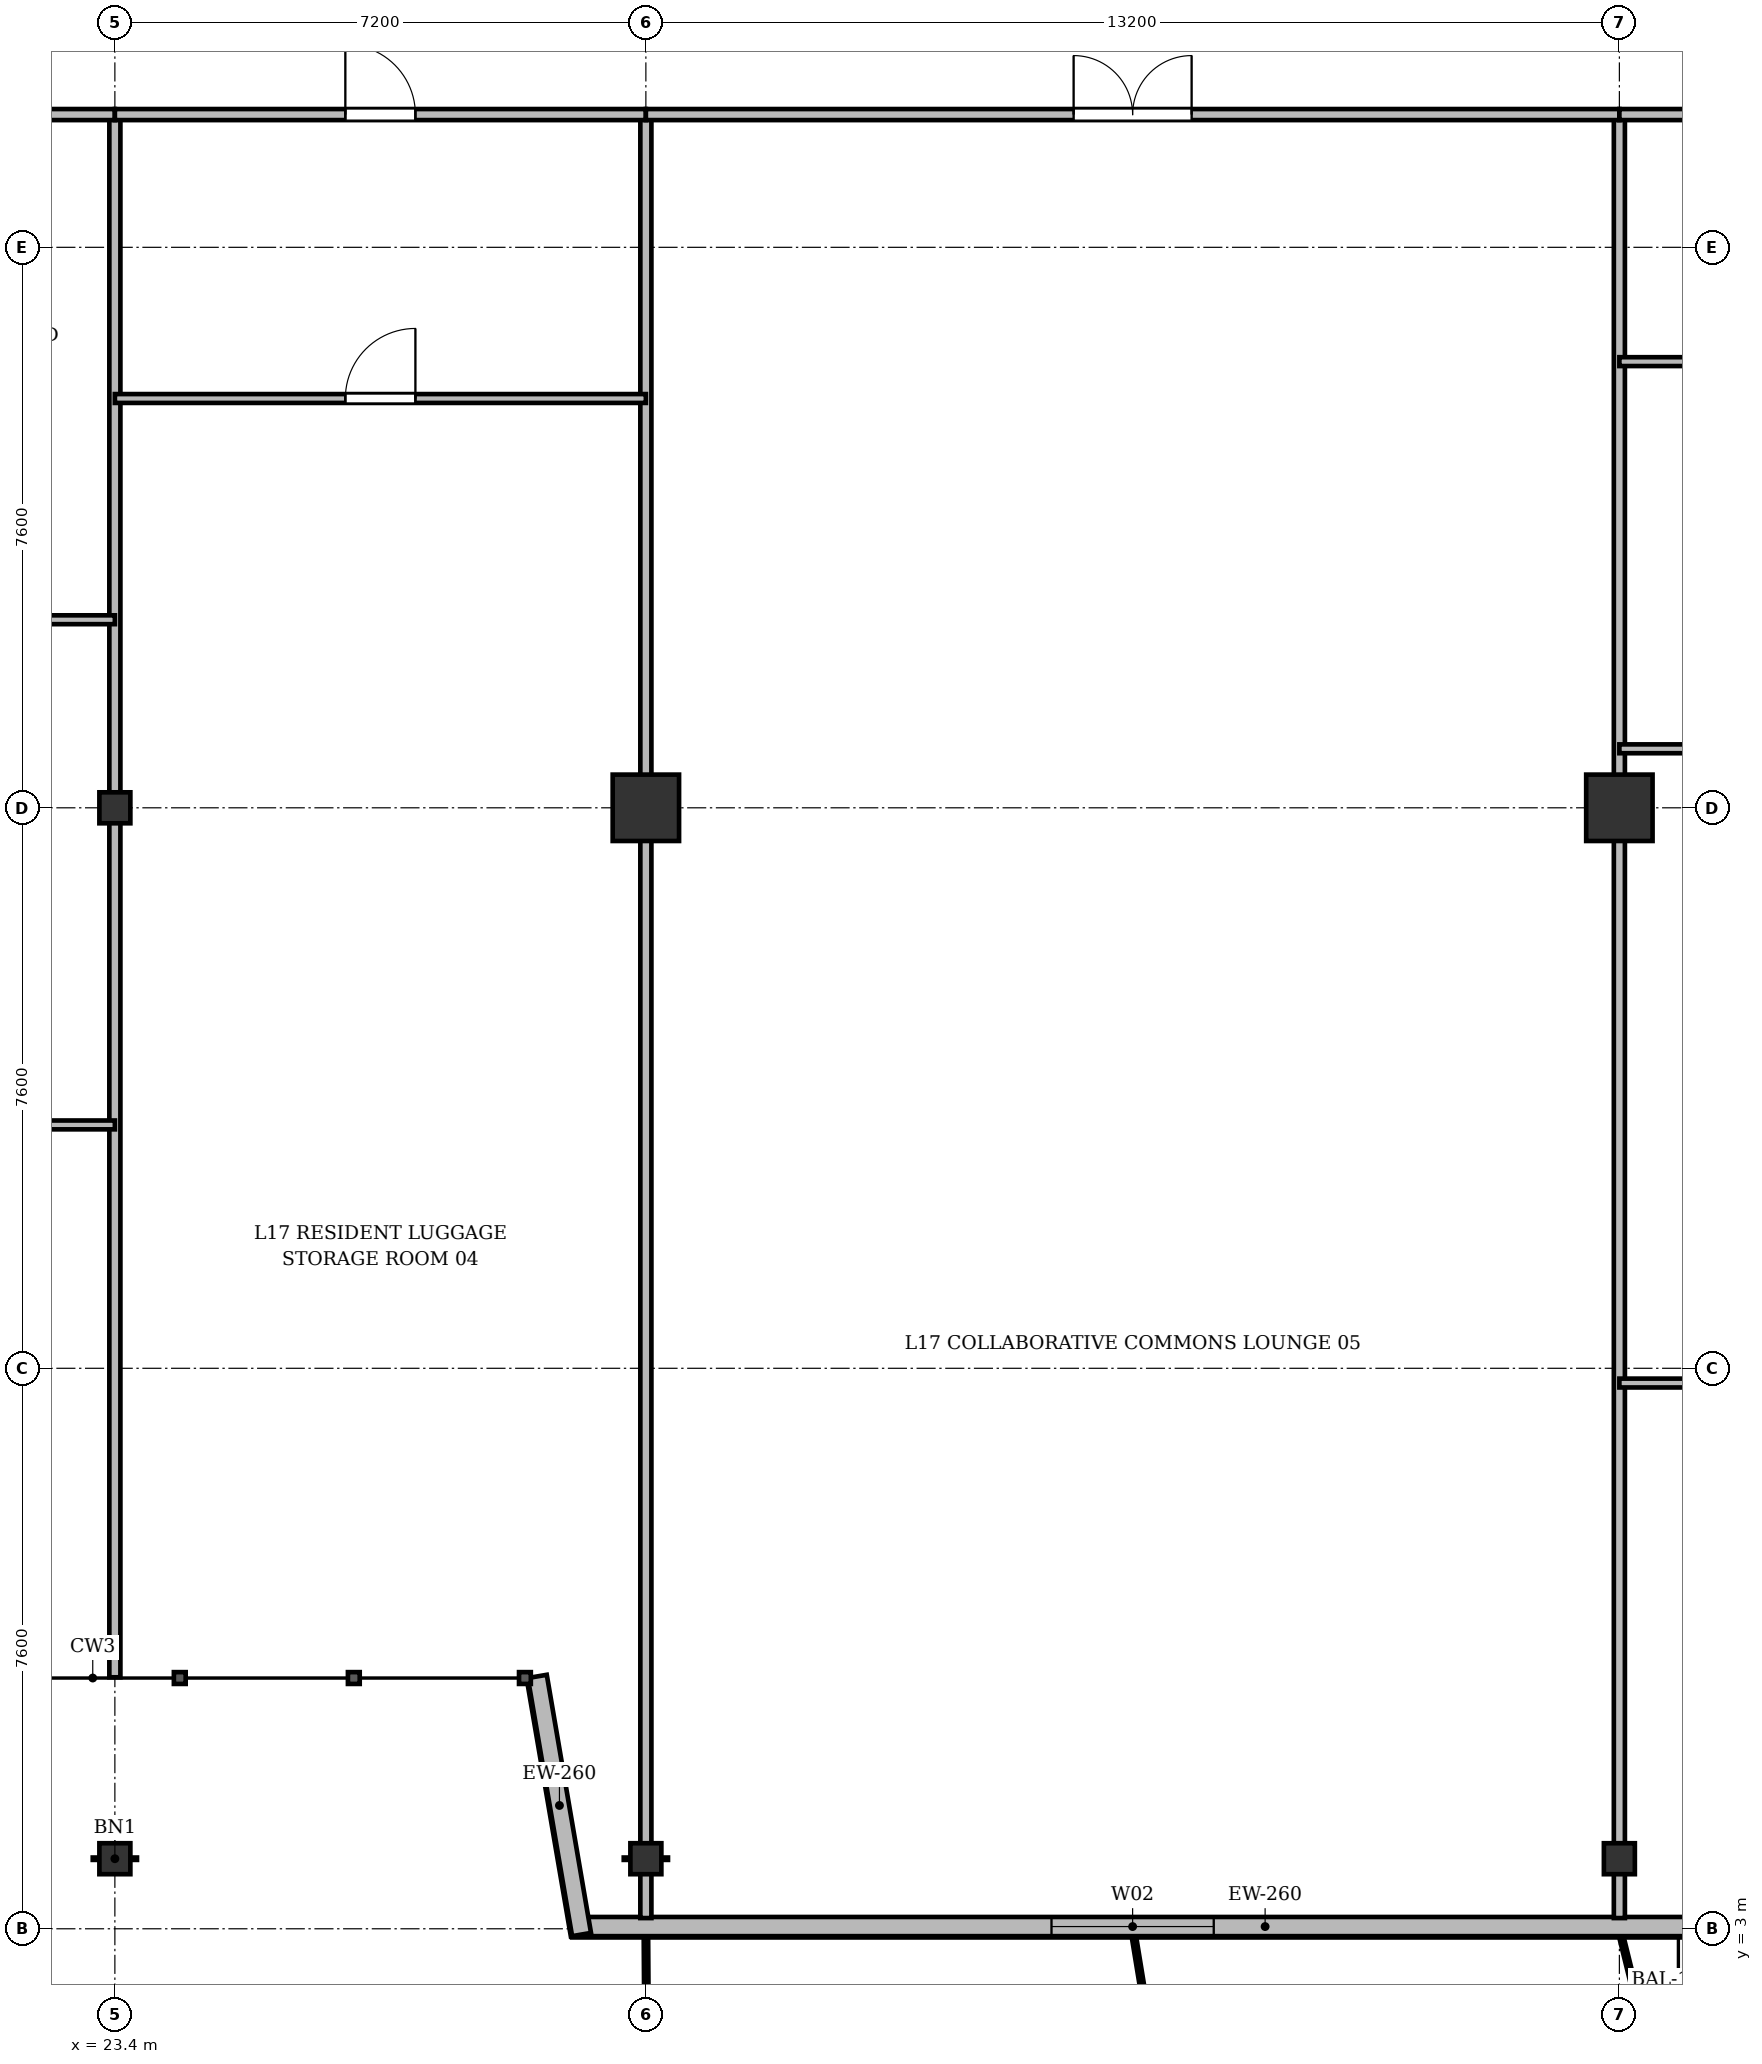
"""IFC4 building model, lengths in metres.
Left out: names, types, materials, properties, quantities, classifications, styles, units other than length and angle.
Written with IfcOpenShell. Run it as: python <this file> out.ifc"""

import sys

from ifc_helpers import new_model, si_unit, direction, frame, frame_2d, origin, origin_2d, place, context, subcontext, project, spatial, rectangle, i_section, extrude, source, transform, mapped, element, fill, save


model = new_model("IFC4")
c1 = context("Model", 3, precision=1e-05, world=origin(), true_north=direction((0.0, 1.0)))
c2 = subcontext(c1, "Body", "Model", "MODEL_VIEW")
j1 = project(units=[si_unit("LENGTHUNIT", "METRE"), si_unit("PLANEANGLEUNIT", "RADIAN")], contexts=[c1])
p1 = place(None, origin())
s1 = spatial("IfcSite", under=j1, at=p1, CompositionType="ELEMENT")
p2 = place(p1, origin())
s2 = spatial("IfcBuilding", under=s1, at=p2, CompositionType="ELEMENT")
p3 = place(p2, frame((0.0, 0.0, 66.7)))
s3 = spatial("IfcBuildingStorey", under=s2, at=p3, CompositionType="ELEMENT", Elevation=66.7)
m1 = source(origin(), c2, "Body", "SweptSolid", [
    extrude(i_section(OverallWidth=0.42, OverallDepth=0.42, WebThickness=0.026, FlangeThickness=0.04, at=origin_2d()), origin(), (0.0, 0.0, 1.0), 3.6),
])
for number, where, z_axis, x_axis in (
    (1, (23.4, 3.95, 0.0), (0.0, 0.0, 1.0), (1.0, 0.0, 0.0)),
    (2, (23.4, 18.2, 0.0), (0.0, 0.0, 1.0), (1.0, 0.0, 0.0)),
    (3, (30.6, 3.95, 0.0), (0.0, 0.0, 1.0), (1.0, 0.0, 0.0)),
):
    element("IfcColumn", number, at=place(p3, frame(where, z_axis=z_axis, x_axis=x_axis)), inside=s3, PredefinedType="COLUMN", context=c2, shape_type="MappedRepresentation", body=[
        mapped(m1, transform((0.0, 0.0, 0.0), x_axis=(1.0, 0.0, 0.0), y_axis=(0.0, 1.0, 0.0), z_axis=(0.0, 0.0, 1.0), scale=1.0)),
    ])
m2 = source(origin(), c2, "Body", "SweptSolid", [
    extrude(rectangle(XDim=0.9, YDim=0.9, at=origin_2d()), origin(), (0.0, 0.0, 1.0), 3.6),
])
p4 = place(p3, frame((30.6, 18.2, 0.0), z_axis=(0.0, 0.0, 1.0), x_axis=(1.0, 0.0, 0.0)))
e4 = element("IfcColumn", 4, at=p4, inside=s3, PredefinedType="COLUMN", context=c2, shape_type="MappedRepresentation", body=[
    mapped(m2, transform((0.0, 0.0, 0.0), x_axis=(1.0, 0.0, 0.0), y_axis=(0.0, 1.0, 0.0), z_axis=(0.0, 0.0, 1.0), scale=1.0)),
])
p5 = place(p3, frame((43.8, 3.95, 0.0), z_axis=(0.0, 0.0, 1.0), x_axis=(1.0, 0.0, 0.0)))
e5 = element("IfcColumn", 5, at=p5, inside=s3, PredefinedType="COLUMN", context=c2, shape_type="MappedRepresentation", body=[
    mapped(m1, transform((0.0, 0.0, 0.0), x_axis=(1.0, 0.0, 0.0), y_axis=(0.0, 1.0, 0.0), z_axis=(0.0, 0.0, 1.0), scale=1.0)),
])
p6 = place(p3, frame((43.8, 18.2, 0.0), z_axis=(0.0, 0.0, 1.0), x_axis=(1.0, 0.0, 0.0)))
e6 = element("IfcColumn", 6, at=p6, inside=s3, PredefinedType="COLUMN", context=c2, shape_type="MappedRepresentation", body=[
    mapped(m2, transform((0.0, 0.0, 0.0), x_axis=(1.0, 0.0, 0.0), y_axis=(0.0, 1.0, 0.0), z_axis=(0.0, 0.0, 1.0), scale=1.0)),
])
p7 = place(p3, frame((66.9, 3.03, 0.0), z_axis=(0.0, 0.0, 1.0), x_axis=(-1.0, 0.0, 0.0)))
e7 = element("IfcWall", 7, at=p7, inside=s3, PredefinedType="SOLIDWALL", context=c2, shape_type="SweptSolid", body=[
    extrude(rectangle(XDim=37.3, YDim=0.26, at=frame_2d((18.65, 0.0))), origin(), (0.0, 0.0, 1.0), 3.34),
])
p8 = place(p7, frame((3.345, 0.0, 0.9)))
e8 = element("IfcOpeningElement", 8, at=p8, cuts=e7, PredefinedType="OPENING", context=c2, shape_type="SweptSolid", body=[
    extrude(rectangle(XDim=1.5, YDim=1.75, at=frame_2d((0.75, 0.875))), frame((0.0, 0.14, 0.0), z_axis=(0.0, -1.0, 0.0), x_axis=(1.0, 0.0, 0.0)), (0.0, 0.0, 1.0), 0.28),
])
p9 = place(p7, frame((11.0, 0.0, 0.9)))
e9 = element("IfcOpeningElement", 9, at=p9, cuts=e7, PredefinedType="OPENING", context=c2, shape_type="SweptSolid", body=[
    extrude(rectangle(XDim=2.0, YDim=1.95, at=frame_2d((1.0, 0.975))), frame((0.0, 0.14, 0.0), z_axis=(0.0, -1.0, 0.0), x_axis=(1.0, 0.0, 0.0)), (0.0, 0.0, 1.0), 0.28),
])
p10 = place(p7, frame((17.007, 0.0, 0.0)))
e10 = element("IfcOpeningElement", 10, at=p10, cuts=e7, PredefinedType="OPENING", context=c2, shape_type="SweptSolid", body=[
    extrude(rectangle(XDim=1.2, YDim=2.2, at=frame_2d((0.6, 1.1))), frame((0.0, 0.14, 0.0), z_axis=(0.0, -1.0, 0.0), x_axis=(1.0, 0.0, 0.0)), (0.0, 0.0, 1.0), 0.28),
])
p11 = place(p7, frame((20.4, 0.0, 0.9)))
e11 = element("IfcOpeningElement", 11, at=p11, cuts=e7, PredefinedType="OPENING", context=c2, shape_type="SweptSolid", body=[
    extrude(rectangle(XDim=1.8, YDim=1.8, at=frame_2d((0.9, 0.9))), frame((0.0, 0.14, 0.0), z_axis=(0.0, -1.0, 0.0), x_axis=(1.0, 0.0, 0.0)), (0.0, 0.0, 1.0), 0.28),
])
p12 = place(p7, frame((28.6, 0.0, 0.9)))
e12 = element("IfcOpeningElement", 12, at=p12, cuts=e7, PredefinedType="OPENING", context=c2, shape_type="SweptSolid", body=[
    extrude(rectangle(XDim=2.2, YDim=1.8, at=frame_2d((1.1, 0.9))), frame((0.0, 0.14, 0.0), z_axis=(0.0, -1.0, 0.0), x_axis=(1.0, 0.0, 0.0)), (0.0, 0.0, 1.0), 0.28),
])
p13 = place(p3, frame((29.728, 2.922, 0.0), z_axis=(0.0, 0.0, 1.0), x_axis=(-0.168923741424, 0.98562912375, 0.0)))
e13 = element("IfcWall", 13, at=p13, inside=s3, PredefinedType="SOLIDWALL", context=c2, shape_type="SweptSolid", body=[
    extrude(rectangle(XDim=3.551, YDim=0.26, at=frame_2d((1.775, 0.0))), origin(), (0.0, 0.0, 1.0), 2.69),
])
p14 = place(p3, frame((23.4, 6.41, 0.0), z_axis=(0.0, 0.0, 1.0), x_axis=(0.0, 1.0, 0.0)))
e14 = element("IfcWall", 14, at=p14, inside=s3, PredefinedType="PARTITIONING", context=c2, shape_type="SweptSolid", body=[
    extrude(rectangle(XDim=21.19, YDim=0.15, at=frame_2d((10.595, 0.0))), origin(), (0.0, 0.0, 1.0), 2.752),
])
for number, where, z_axis, x_axis in (
    (15, (30.6, 3.145, 0.0), (0.0, 0.0, 1.0), (0.0, 1.0, 0.0)),
    (16, (43.8, 3.145, 0.0), (0.0, 0.0, 1.0), (0.0, 1.0, 0.0)),
):
    element("IfcWall", number, at=place(p3, frame(where, z_axis=z_axis, x_axis=x_axis)), inside=s3, PredefinedType="PARTITIONING", context=c2, shape_type="SweptSolid", body=[
        extrude(rectangle(XDim=24.455, YDim=0.15, at=frame_2d((12.228, 0.0))), origin(), (0.0, 0.0, 1.0), 2.752),
    ])
p15 = place(p3, frame((15.6, 20.75, 0.0), z_axis=(0.0, 0.0, 1.0), x_axis=(1.0, 0.0, 0.0)))
e17 = element("IfcWall", 17, at=p15, inside=s3, PredefinedType="PARTITIONING", context=c2, shape_type="SweptSolid", body=[
    extrude(rectangle(XDim=7.8, YDim=0.12, at=frame_2d((3.9, 0.0))), origin(), (0.0, 0.0, 1.0), 2.752),
])
p16 = place(p15, frame((3.333, 0.0, 0.0)))
e18 = element("IfcOpeningElement", 18, at=p16, cuts=e17, PredefinedType="OPENING", context=c2, shape_type="SweptSolid", body=[
    extrude(rectangle(XDim=0.95, YDim=2.15, at=frame_2d((0.475, 1.075))), frame((0.0, 0.07, 0.0), z_axis=(0.0, -1.0, 0.0), x_axis=(1.0, 0.0, 0.0)), (0.0, 0.0, 1.0), 0.14),
])
p17 = place(p3, frame((15.6, 27.6, 0.0), z_axis=(0.0, 0.0, 1.0), x_axis=(1.0, 0.0, 0.0)))
e19 = element("IfcWall", 19, at=p17, inside=s3, PredefinedType="PARTITIONING", context=c2, shape_type="SweptSolid", body=[
    extrude(rectangle(XDim=7.8, YDim=0.15, at=frame_2d((3.9, 0.0))), origin(), (0.0, 0.0, 1.0), 2.752),
])
p18 = place(p17, frame((5.172, 0.0, 0.0)))
e20 = element("IfcOpeningElement", 20, at=p18, cuts=e19, PredefinedType="OPENING", context=c2, shape_type="SweptSolid", body=[
    extrude(rectangle(XDim=0.95, YDim=2.15, at=frame_2d((0.475, 1.075))), frame((0.0, 0.085, 0.0), z_axis=(0.0, -1.0, 0.0), x_axis=(1.0, 0.0, 0.0)), (0.0, 0.0, 1.0), 0.17),
])
p19 = place(p3, frame((19.5, 13.9, 0.0), z_axis=(0.0, 0.0, 1.0), x_axis=(1.0, 0.0, 0.0)))
e21 = element("IfcWall", 21, at=p19, inside=s3, PredefinedType="PARTITIONING", context=c2, shape_type="SweptSolid", body=[
    extrude(rectangle(XDim=3.9, YDim=0.12, at=frame_2d((1.95, 0.0))), origin(), (0.0, 0.0, 1.0), 2.752),
])
p20 = place(p19, frame((1.475, 0.0, 0.0)))
e22 = element("IfcOpeningElement", 22, at=p20, cuts=e21, PredefinedType="OPENING", context=c2, shape_type="SweptSolid", body=[
    extrude(rectangle(XDim=0.95, YDim=2.15, at=frame_2d((0.475, 1.075))), frame((0.0, 0.07, 0.0), z_axis=(0.0, -1.0, 0.0), x_axis=(1.0, 0.0, 0.0)), (0.0, 0.0, 1.0), 0.14),
])
p21 = place(p3, frame((23.4, 27.6, 0.0), z_axis=(0.0, 0.0, 1.0), x_axis=(1.0, 0.0, 0.0)))
e23 = element("IfcWall", 23, at=p21, inside=s3, PredefinedType="PARTITIONING", context=c2, shape_type="SweptSolid", body=[
    extrude(rectangle(XDim=7.2, YDim=0.15, at=frame_2d((3.6, 0.0))), origin(), (0.0, 0.0, 1.0), 2.752),
])
p22 = place(p21, frame((3.125, 0.0, 0.0)))
e24 = element("IfcOpeningElement", 24, at=p22, cuts=e23, PredefinedType="OPENING", context=c2, shape_type="SweptSolid", body=[
    extrude(rectangle(XDim=0.95, YDim=2.15, at=frame_2d((0.475, 1.075))), frame((0.0, 0.085, 0.0), z_axis=(0.0, -1.0, 0.0), x_axis=(1.0, 0.0, 0.0)), (0.0, 0.0, 1.0), 0.17),
])
p23 = place(p3, frame((23.4, 23.75, 0.0), z_axis=(0.0, 0.0, 1.0), x_axis=(1.0, 0.0, 0.0)))
e25 = element("IfcWall", 25, at=p23, inside=s3, PredefinedType="PARTITIONING", context=c2, shape_type="SweptSolid", body=[
    extrude(rectangle(XDim=7.2, YDim=0.12, at=frame_2d((3.6, 0.0))), origin(), (0.0, 0.0, 1.0), 2.752),
])
p24 = place(p23, frame((3.125, 0.0, 0.0)))
e26 = element("IfcOpeningElement", 26, at=p24, cuts=e25, PredefinedType="OPENING", context=c2, shape_type="SweptSolid", body=[
    extrude(rectangle(XDim=0.95, YDim=2.15, at=frame_2d((0.475, 1.075))), frame((0.0, 0.07, 0.0), z_axis=(0.0, -1.0, 0.0), x_axis=(1.0, 0.0, 0.0)), (0.0, 0.0, 1.0), 0.14),
])
p25 = place(p3, frame((30.6, 27.6, 0.0), z_axis=(0.0, 0.0, 1.0), x_axis=(1.0, 0.0, 0.0)))
e27 = element("IfcWall", 27, at=p25, inside=s3, PredefinedType="PARTITIONING", context=c2, shape_type="SweptSolid", body=[
    extrude(rectangle(XDim=13.2, YDim=0.15, at=frame_2d((6.6, 0.0))), origin(), (0.0, 0.0, 1.0), 2.752),
])
p26 = place(p25, frame((5.8, 0.0, 0.0)))
e28 = element("IfcOpeningElement", 28, at=p26, cuts=e27, PredefinedType="OPENING", context=c2, shape_type="SweptSolid", body=[
    extrude(rectangle(XDim=1.6, YDim=2.2, at=frame_2d((0.8, 1.1))), frame((0.0, 0.085, 0.0), z_axis=(0.0, -1.0, 0.0), x_axis=(1.0, 0.0, 0.0)), (0.0, 0.0, 1.0), 0.17),
])
p27 = place(p3, frame((43.8, 19.0, 0.0), z_axis=(0.0, 0.0, 1.0), x_axis=(1.0, 0.0, 0.0)))
e29 = element("IfcWall", 29, at=p27, inside=s3, PredefinedType="PARTITIONING", context=c2, shape_type="SweptSolid", body=[
    extrude(rectangle(XDim=7.2, YDim=0.12, at=frame_2d((3.6, 0.0))), origin(), (0.0, 0.0, 1.0), 2.752),
])
p28 = place(p27, frame((3.125, 0.0, 0.0)))
e30 = element("IfcOpeningElement", 30, at=p28, cuts=e29, PredefinedType="OPENING", context=c2, shape_type="SweptSolid", body=[
    extrude(rectangle(XDim=0.95, YDim=2.15, at=frame_2d((0.475, 1.075))), frame((0.0, 0.07, 0.0), z_axis=(0.0, -1.0, 0.0), x_axis=(1.0, 0.0, 0.0)), (0.0, 0.0, 1.0), 0.14),
])
p29 = place(p3, frame((43.8, 24.25, 0.0), z_axis=(0.0, 0.0, 1.0), x_axis=(1.0, 0.0, 0.0)))
e31 = element("IfcWall", 31, at=p29, inside=s3, PredefinedType="PARTITIONING", context=c2, shape_type="SweptSolid", body=[
    extrude(rectangle(XDim=2.4, YDim=0.12, at=frame_2d((1.2, 0.0))), origin(), (0.0, 0.0, 1.0), 2.752),
])
p30 = place(p3, frame((43.8, 27.6, 0.0), z_axis=(0.0, 0.0, 1.0), x_axis=(1.0, 0.0, 0.0)))
e32 = element("IfcWall", 32, at=p30, inside=s3, PredefinedType="PARTITIONING", context=c2, shape_type="SweptSolid", body=[
    extrude(rectangle(XDim=7.2, YDim=0.15, at=frame_2d((3.6, 0.0))), origin(), (0.0, 0.0, 1.0), 2.752),
])
p31 = place(p30, frame((4.706, 0.0, 0.0)))
e33 = element("IfcOpeningElement", 33, at=p31, cuts=e32, PredefinedType="OPENING", context=c2, shape_type="SweptSolid", body=[
    extrude(rectangle(XDim=0.95, YDim=2.15, at=frame_2d((0.475, 1.075))), frame((0.0, 0.085, 0.0), z_axis=(0.0, -1.0, 0.0), x_axis=(1.0, 0.0, 0.0)), (0.0, 0.0, 1.0), 0.17),
])
p32 = place(p3, frame((43.8, 10.4, 0.0), z_axis=(0.0, 0.0, 1.0), x_axis=(1.0, 0.0, 0.0)))
e34 = element("IfcWall", 34, at=p32, inside=s3, PredefinedType="PARTITIONING", context=c2, shape_type="SweptSolid", body=[
    extrude(rectangle(XDim=3.6, YDim=0.12, at=frame_2d((1.8, 0.0))), origin(), (0.0, 0.0, 1.0), 2.752),
])
p33 = place(p32, frame((1.325, 0.0, 0.0)))
e35 = element("IfcOpeningElement", 35, at=p33, cuts=e34, PredefinedType="OPENING", context=c2, shape_type="SweptSolid", body=[
    extrude(rectangle(XDim=0.95, YDim=2.15, at=frame_2d((0.475, 1.075))), frame((0.0, 0.07, 0.0), z_axis=(0.0, -1.0, 0.0), x_axis=(1.0, 0.0, 0.0)), (0.0, 0.0, 1.0), 0.14),
])
m3 = source(origin(), c2, "Body", "SweptSolid", [
    extrude(rectangle(XDim=2.2, YDim=1.8, at=frame_2d((1.1, 0.9))), frame((0.0, 0.03, 0.0), z_axis=(0.0, -1.0, 0.0), x_axis=(1.0, 0.0, 0.0)), (0.0, 0.0, 1.0), 0.06),
])
p34 = place(p12, origin())
e36 = element("IfcWindow", 36, at=p34, inside=s3, PartitioningType="SINGLE_PANEL", PredefinedType="WINDOW", context=c2, shape_type="MappedRepresentation", body=[
    mapped(m3, transform((0.0, 0.0, 0.0), x_axis=(1.0, 0.0, 0.0), y_axis=(0.0, 1.0, 0.0), z_axis=(0.0, 0.0, 1.0), scale=1.0)),
])
fill(e12, e36)
m4 = source(origin(), c2, "Body", "SweptSolid", [
    extrude(rectangle(XDim=0.95, YDim=2.15, at=frame_2d((0.475, 1.075))), frame((0.0, 0.025, 0.0), z_axis=(0.0, -1.0, 0.0), x_axis=(1.0, 0.0, 0.0)), (0.0, 0.0, 1.0), 0.05),
])
p35 = place(p22, origin())
e37 = element("IfcDoor", 37, at=p35, inside=s3, OperationType="SINGLE_SWING_LEFT", PredefinedType="DOOR", context=c2, shape_type="MappedRepresentation", body=[
    mapped(m4, transform((0.0, 0.0, 0.0), x_axis=(1.0, 0.0, 0.0), y_axis=(0.0, 1.0, 0.0), z_axis=(0.0, 0.0, 1.0), scale=1.0)),
])
fill(e24, e37)
p36 = place(p24, origin())
e38 = element("IfcDoor", 38, at=p36, inside=s3, OperationType="SINGLE_SWING_RIGHT", PredefinedType="DOOR", context=c2, shape_type="MappedRepresentation", body=[
    mapped(m4, transform((0.0, 0.0, 0.0), x_axis=(1.0, 0.0, 0.0), y_axis=(0.0, 1.0, 0.0), z_axis=(0.0, 0.0, 1.0), scale=1.0)),
])
fill(e26, e38)
m5 = source(origin(), c2, "Body", "SweptSolid", [
    extrude(rectangle(XDim=1.6, YDim=2.2, at=frame_2d((0.8, 1.1))), frame((0.0, 0.025, 0.0), z_axis=(0.0, -1.0, 0.0), x_axis=(1.0, 0.0, 0.0)), (0.0, 0.0, 1.0), 0.05),
])
p37 = place(p26, origin())
e39 = element("IfcDoor", 39, at=p37, inside=s3, OperationType="DOUBLE_DOOR_SINGLE_SWING", PredefinedType="DOOR", context=c2, shape_type="MappedRepresentation", body=[
    mapped(m5, transform((0.0, 0.0, 0.0), x_axis=(1.0, 0.0, 0.0), y_axis=(0.0, 1.0, 0.0), z_axis=(0.0, 0.0, 1.0), scale=1.0)),
])
fill(e28, e39)
save(model, sys.argv[1])
